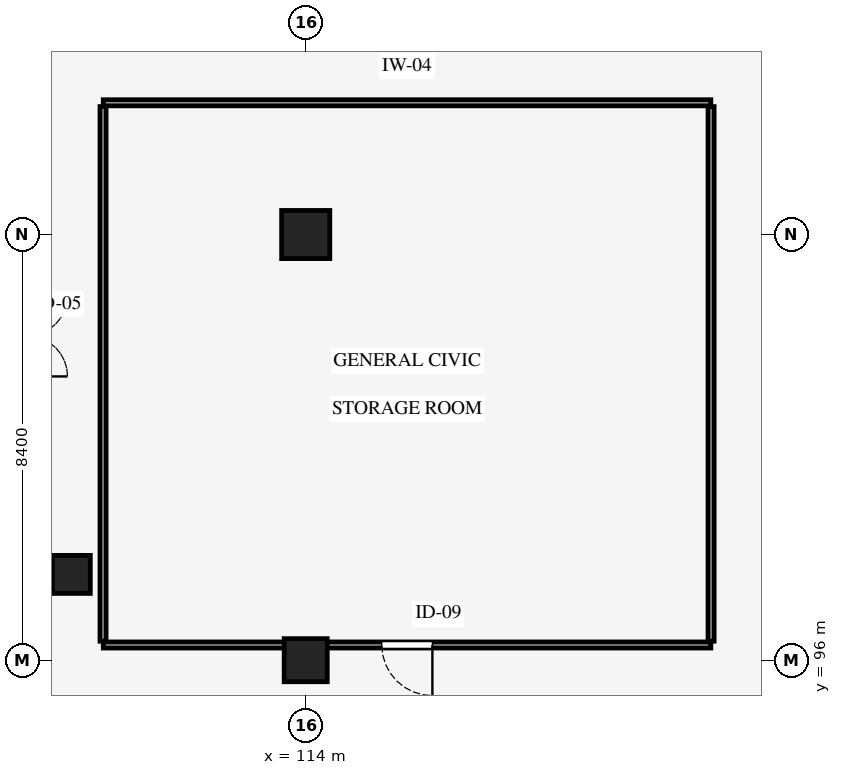
"""IFC4 building model, lengths in metres.
Left out: names, types, materials, properties, quantities, classifications, styles, units other than length and angle.
Written with IfcOpenShell. Run it as: python <this file> out.ifc"""

import sys

from ifc_helpers import new_model, si_unit, direction, frame, frame_2d, origin, origin_2d, place, context, subcontext, project, spatial, rectangle, circle, extrude, element, fill, save


model = new_model("IFC4")
c1 = context("Model", 3, precision=1e-05, world=origin(), true_north=direction((0.0, 1.0)))
c2 = subcontext(c1, "Body", "Model", "MODEL_VIEW")
j1 = project(units=[si_unit("LENGTHUNIT", "METRE"), si_unit("PLANEANGLEUNIT", "RADIAN")], contexts=[c1])
p1 = place(None, origin())
s1 = spatial("IfcSite", under=j1, at=p1, CompositionType="ELEMENT")
p2 = place(p1, origin())
s2 = spatial("IfcBuilding", under=s1, at=p2, CompositionType="ELEMENT")
p3 = place(p2, frame((0.0, 0.0, -4.8)))
s3 = spatial("IfcBuildingStorey", under=s2, at=p3, CompositionType="ELEMENT", Elevation=-4.8)
p4 = place(p3, frame((109.373, 97.693, 0.0), z_axis=(0.0, 0.0, 1.0), x_axis=(1.0, 0.0, 0.0)))
e1 = element("IfcColumn", 1, at=p4, inside=s3, PredefinedType="COLUMN", context=c2, shape_type="SweptSolid", body=[
    extrude(circle(Radius=0.375, at=origin_2d()), origin(), (0.0, 0.0, 1.0), 4.8),
])
p5 = place(p3, frame((114.0, 96.0, 0.0), z_axis=(0.0, 0.0, 1.0), x_axis=(1.0, 0.0, 0.0)))
e2 = element("IfcColumn", 2, at=p5, inside=s3, PredefinedType="COLUMN", context=c2, shape_type="SweptSolid", body=[
    extrude(rectangle(XDim=0.85, YDim=0.85, at=origin_2d()), origin(), (0.0, 0.0, 1.0), 4.8),
])
p6 = place(p3, frame((114.0, 104.4, 0.0), z_axis=(0.0, 0.0, 1.0), x_axis=(1.0, 0.0, 0.0)))
e3 = element("IfcColumn", 3, at=p6, inside=s3, PredefinedType="COLUMN", context=c2, shape_type="SweptSolid", body=[
    extrude(rectangle(XDim=0.95, YDim=0.95, at=origin_2d()), origin(), (0.0, 0.0, 1.0), 4.8),
])
p7 = place(p3, frame((122.0, 106.925, 0.0), z_axis=(0.0, 0.0, 1.0), x_axis=(0.0, -1.0, 0.0)))
e4 = element("IfcWall", 4, at=p7, inside=s3, PredefinedType="STANDARD", context=c2, shape_type="SweptSolid", body=[
    extrude(rectangle(XDim=10.55, YDim=0.12, at=frame_2d((5.275, 0.0))), origin(), (0.0, 0.0, 1.0), 4.45),
])
p8 = place(p3, frame((121.995, 96.3, 0.0), z_axis=(0.0, 0.0, 1.0), x_axis=(-1.0, 0.0, 0.0)))
e5 = element("IfcWall", 5, at=p8, inside=s3, PredefinedType="STANDARD", context=c2, shape_type="SweptSolid", body=[
    extrude(rectangle(XDim=11.99, YDim=0.12, at=frame_2d((5.995, 0.0))), origin(), (0.0, 0.0, 1.0), 3.5),
])
p9 = place(p8, frame((5.495, 0.0, 0.0)))
e6 = element("IfcOpeningElement", 6, at=p9, cuts=e5, PredefinedType="OPENING", context=c2, shape_type="SweptSolid", body=[
    extrude(rectangle(XDim=1.0, YDim=2.1, at=frame_2d((0.5, 1.05))), frame((0.0, 0.07, 0.0), z_axis=(0.0, -1.0, 0.0), x_axis=(1.0, 0.0, 0.0)), (0.0, 0.0, 1.0), 0.14),
])
p10 = place(p3, frame((110.0, 96.375, 0.0), z_axis=(0.0, 0.0, 1.0), x_axis=(0.0, 1.0, 0.0)))
e7 = element("IfcWall", 7, at=p10, inside=s3, PredefinedType="STANDARD", context=c2, shape_type="SweptSolid", body=[
    extrude(rectangle(XDim=10.55, YDim=0.12, at=frame_2d((5.275, 0.0))), origin(), (0.0, 0.0, 1.0), 3.5),
])
p11 = place(p3, frame((110.005, 107.0, 0.0), z_axis=(0.0, 0.0, 1.0), x_axis=(1.0, 0.0, 0.0)))
e8 = element("IfcWall", 8, at=p11, inside=s3, PredefinedType="STANDARD", context=c2, shape_type="SweptSolid", body=[
    extrude(rectangle(XDim=11.99, YDim=0.12, at=frame_2d((5.995, 0.0))), origin(), (0.0, 0.0, 1.0), 4.1),
])
p12 = place(p9, origin())
e9 = element("IfcDoor", 9, at=p12, inside=s3, OperationType="SINGLE_SWING_LEFT", PredefinedType="DOOR", context=c2, shape_type="SweptSolid", body=[
    extrude(rectangle(XDim=1.0, YDim=2.1, at=frame_2d((0.5, 1.05))), frame((0.0, 0.025, 0.0), z_axis=(0.0, -1.0, 0.0), x_axis=(1.0, 0.0, 0.0)), (0.0, 0.0, 1.0), 0.05),
])
fill(e6, e9)
save(model, sys.argv[1])
